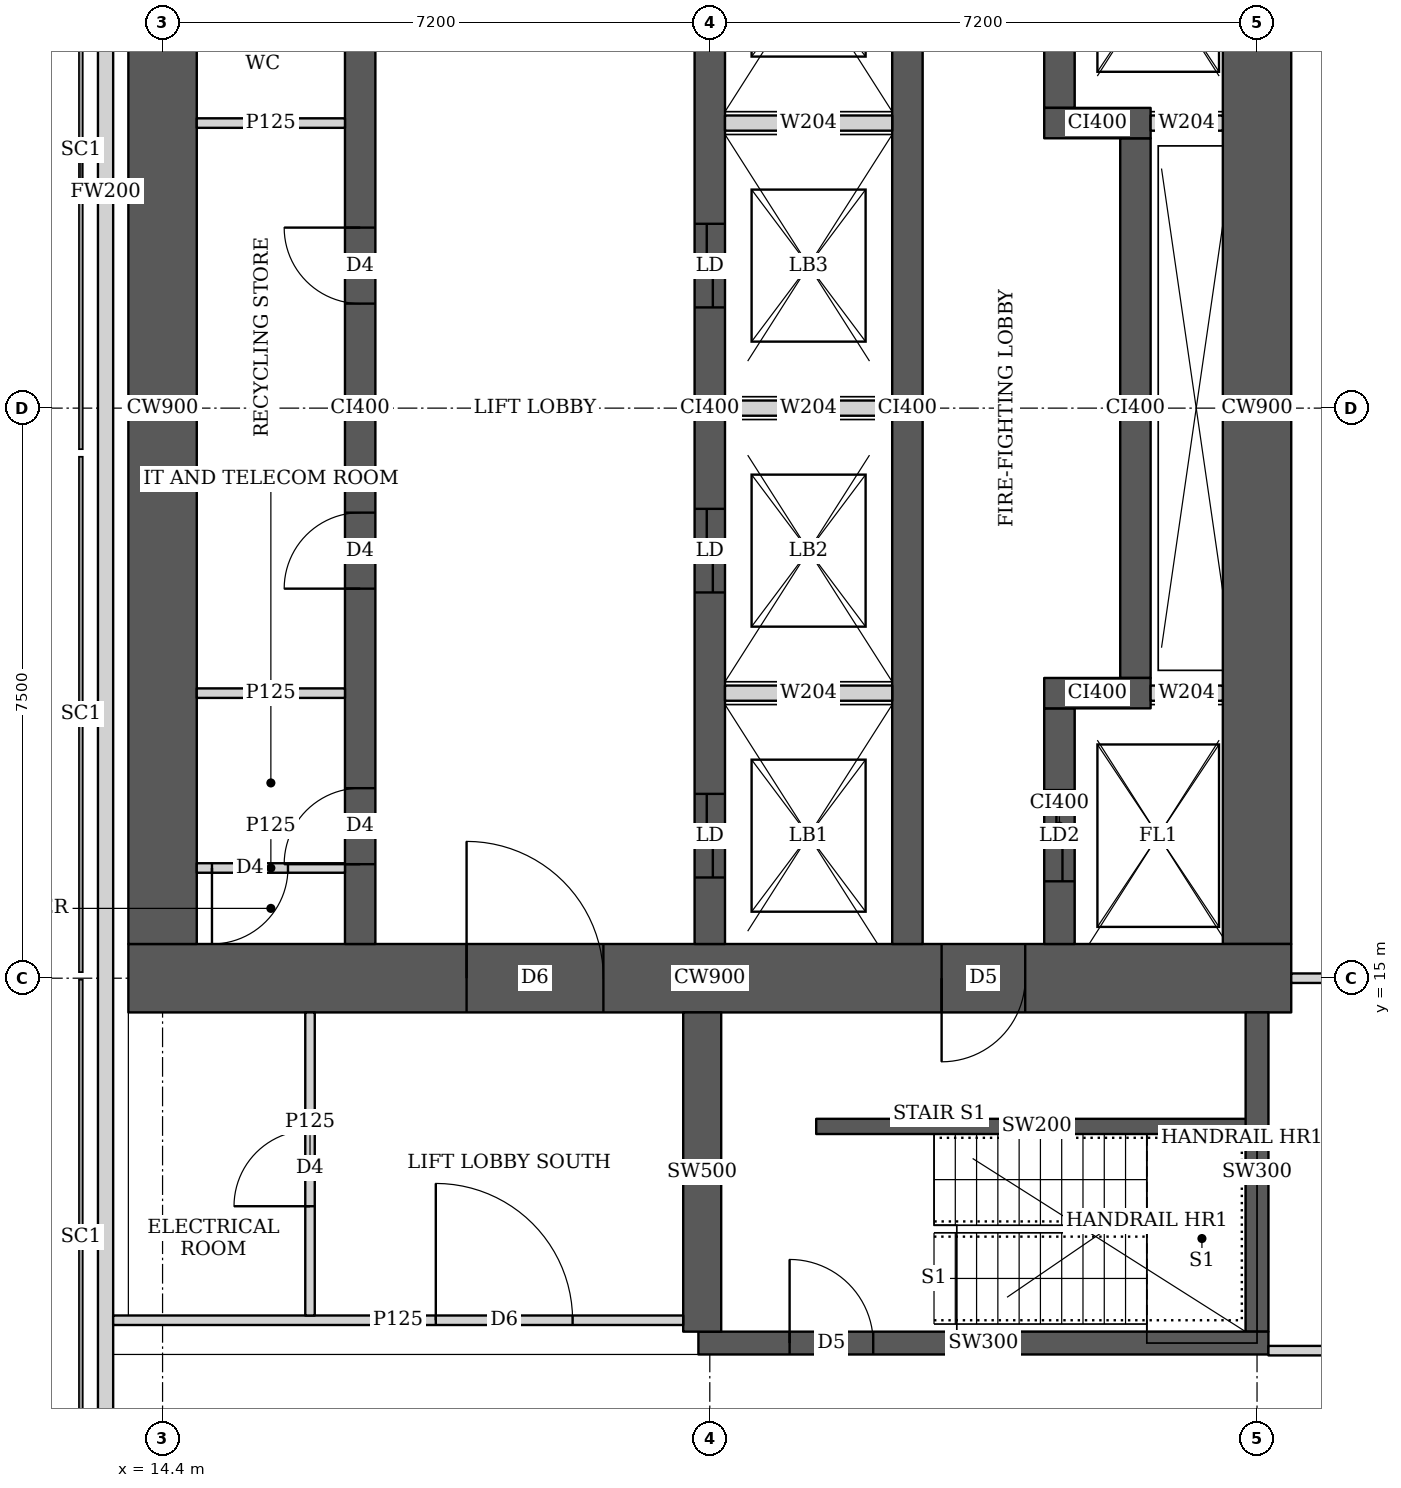
"""IFC4 building model, lengths in metres.
Left out: names, types, materials, properties, quantities, classifications, styles, units other than length and angle.
Written with IfcOpenShell. Run it as: python <this file> out.ifc"""

import sys

from ifc_helpers import new_model, si_unit, direction, frame, frame_2d, origin, place, context, subcontext, project, spatial, rectangle, extrude, element, fill, save


model = new_model("IFC4")
c1 = context("Model", 3, precision=1e-05, world=origin(), true_north=direction((0.0, 1.0)))
c2 = subcontext(c1, "Body", "Model", "MODEL_VIEW")
j1 = project(units=[si_unit("LENGTHUNIT", "METRE"), si_unit("PLANEANGLEUNIT", "RADIAN")], contexts=[c1])
p1 = place(None, origin())
s1 = spatial("IfcSite", under=j1, at=p1, CompositionType="ELEMENT")
p2 = place(p1, origin())
s2 = spatial("IfcBuilding", under=s1, at=p2, CompositionType="ELEMENT")
p3 = place(p2, frame((0.0, 0.0, 289.1)))
s3 = spatial("IfcBuildingStorey", under=s2, at=p3, CompositionType="ELEMENT", Elevation=289.1)
p4 = place(p3, frame((13.95, 15.0, 0.0), z_axis=(0.0, 0.0, 1.0), x_axis=(1.0, 0.0, 0.0)))
e1 = element("IfcWall", 1, at=p4, inside=s3, PredefinedType="SHEAR", context=c2, shape_type="SweptSolid", body=[
    extrude(rectangle(XDim=15.3, YDim=0.9, at=frame_2d((7.65, 0.0))), origin(), (0.0, 0.0, 1.0), 3.75),
])
p5 = place(p4, frame((4.45, 0.0, 0.0)))
e2 = element("IfcOpeningElement", 2, at=p5, cuts=e1, PredefinedType="OPENING", context=c2, shape_type="SweptSolid", body=[
    extrude(rectangle(XDim=1.8, YDim=2.1, at=frame_2d((0.9, 1.05))), frame((0.0, 0.46, 0.0), z_axis=(0.0, -1.0, 0.0), x_axis=(1.0, 0.0, 0.0)), (0.0, 0.0, 1.0), 0.92),
])
p6 = place(p4, frame((10.7, 0.0, 0.0)))
e3 = element("IfcOpeningElement", 3, at=p6, cuts=e1, PredefinedType="OPENING", context=c2, shape_type="SweptSolid", body=[
    extrude(rectangle(XDim=1.1, YDim=2.1, at=frame_2d((0.55, 1.05))), frame((0.0, 0.46, 0.0), z_axis=(0.0, -1.0, 0.0), x_axis=(1.0, 0.0, 0.0)), (0.0, 0.0, 1.0), 0.92),
])
for number, where, z_axis, x_axis in (
    (4, (14.4, 15.45, 0.0), (0.0, 0.0, 1.0), (0.0, 1.0, 0.0)),
    (5, (28.8, 15.45, 0.0), (0.0, 0.0, 1.0), (0.0, 1.0, 0.0)),
):
    element("IfcWall", number, at=place(p3, frame(where, z_axis=z_axis, x_axis=x_axis)), inside=s3, PredefinedType="SHEAR", context=c2, shape_type="SweptSolid", body=[
        extrude(rectangle(XDim=14.1, YDim=0.9, at=frame_2d((7.05, 0.0))), origin(), (0.0, 0.0, 1.0), 3.75),
    ])
p7 = place(p3, frame((17.0, 15.45, 0.0), z_axis=(0.0, 0.0, 1.0), x_axis=(0.0, 1.0, 0.0)))
e6 = element("IfcWall", 6, at=p7, inside=s3, PredefinedType="SHEAR", context=c2, shape_type="SweptSolid", body=[
    extrude(rectangle(XDim=14.1, YDim=0.4, at=frame_2d((7.05, 0.0))), origin(), (0.0, 0.0, 1.0), 3.75),
])
p8 = place(p7, frame((1.05, 0.0, 0.0)))
e7 = element("IfcOpeningElement", 7, at=p8, cuts=e6, PredefinedType="OPENING", context=c2, shape_type="SweptSolid", body=[
    extrude(rectangle(XDim=1.0, YDim=2.1, at=frame_2d((0.5, 1.05))), frame((0.0, 0.21, 0.0), z_axis=(0.0, -1.0, 0.0), x_axis=(1.0, 0.0, 0.0)), (0.0, 0.0, 1.0), 0.42),
])
p9 = place(p7, frame((4.675, 0.0, 0.0)))
e8 = element("IfcOpeningElement", 8, at=p9, cuts=e6, PredefinedType="OPENING", context=c2, shape_type="SweptSolid", body=[
    extrude(rectangle(XDim=1.0, YDim=2.1, at=frame_2d((0.5, 1.05))), frame((0.0, 0.21, 0.0), z_axis=(0.0, -1.0, 0.0), x_axis=(1.0, 0.0, 0.0)), (0.0, 0.0, 1.0), 0.42),
])
p10 = place(p7, frame((8.425, 0.0, 0.0)))
e9 = element("IfcOpeningElement", 9, at=p10, cuts=e6, PredefinedType="OPENING", context=c2, shape_type="SweptSolid", body=[
    extrude(rectangle(XDim=1.0, YDim=2.1, at=frame_2d((0.5, 1.05))), frame((0.0, 0.21, 0.0), z_axis=(0.0, -1.0, 0.0), x_axis=(1.0, 0.0, 0.0)), (0.0, 0.0, 1.0), 0.42),
])
p11 = place(p7, frame((12.175, 0.0, 0.0)))
e10 = element("IfcOpeningElement", 10, at=p11, cuts=e6, PredefinedType="OPENING", context=c2, shape_type="SweptSolid", body=[
    extrude(rectangle(XDim=1.0, YDim=2.1, at=frame_2d((0.5, 1.05))), frame((0.0, 0.21, 0.0), z_axis=(0.0, -1.0, 0.0), x_axis=(1.0, 0.0, 0.0)), (0.0, 0.0, 1.0), 0.42),
])
p12 = place(p3, frame((21.6, 15.45, 0.0), z_axis=(0.0, 0.0, 1.0), x_axis=(0.0, 1.0, 0.0)))
e11 = element("IfcWall", 11, at=p12, inside=s3, PredefinedType="SHEAR", context=c2, shape_type="SweptSolid", body=[
    extrude(rectangle(XDim=14.1, YDim=0.4, at=frame_2d((7.05, 0.0))), origin(), (0.0, 0.0, 1.0), 3.75),
])
p13 = place(p12, frame((0.875, 0.0, 0.0)))
e12 = element("IfcOpeningElement", 12, at=p13, cuts=e11, PredefinedType="OPENING", context=c2, shape_type="SweptSolid", body=[
    extrude(rectangle(XDim=1.1, YDim=2.1, at=frame_2d((0.55, 1.05))), frame((0.0, 0.21, 0.0), z_axis=(0.0, -1.0, 0.0), x_axis=(1.0, 0.0, 0.0)), (0.0, 0.0, 1.0), 0.42),
])
p14 = place(p12, frame((4.625, 0.0, 0.0)))
e13 = element("IfcOpeningElement", 13, at=p14, cuts=e11, PredefinedType="OPENING", context=c2, shape_type="SweptSolid", body=[
    extrude(rectangle(XDim=1.1, YDim=2.1, at=frame_2d((0.55, 1.05))), frame((0.0, 0.21, 0.0), z_axis=(0.0, -1.0, 0.0), x_axis=(1.0, 0.0, 0.0)), (0.0, 0.0, 1.0), 0.42),
])
p15 = place(p12, frame((8.375, 0.0, 0.0)))
e14 = element("IfcOpeningElement", 14, at=p15, cuts=e11, PredefinedType="OPENING", context=c2, shape_type="SweptSolid", body=[
    extrude(rectangle(XDim=1.1, YDim=2.1, at=frame_2d((0.55, 1.05))), frame((0.0, 0.21, 0.0), z_axis=(0.0, -1.0, 0.0), x_axis=(1.0, 0.0, 0.0)), (0.0, 0.0, 1.0), 0.42),
])
p16 = place(p12, frame((12.125, 0.0, 0.0)))
e15 = element("IfcOpeningElement", 15, at=p16, cuts=e11, PredefinedType="OPENING", context=c2, shape_type="SweptSolid", body=[
    extrude(rectangle(XDim=1.1, YDim=2.1, at=frame_2d((0.55, 1.05))), frame((0.0, 0.21, 0.0), z_axis=(0.0, -1.0, 0.0), x_axis=(1.0, 0.0, 0.0)), (0.0, 0.0, 1.0), 0.42),
])
p17 = place(p3, frame((24.2, 15.45, 0.0), z_axis=(0.0, 0.0, 1.0), x_axis=(0.0, 1.0, 0.0)))
e16 = element("IfcWall", 16, at=p17, inside=s3, PredefinedType="SHEAR", context=c2, shape_type="SweptSolid", body=[
    extrude(rectangle(XDim=14.1, YDim=0.4, at=frame_2d((7.05, 0.0))), origin(), (0.0, 0.0, 1.0), 3.75),
])
p18 = place(p3, frame((26.2, 15.45, 0.0), z_axis=(0.0, 0.0, 1.0), x_axis=(0.0, 1.0, 0.0)))
e17 = element("IfcWall", 17, at=p18, inside=s3, PredefinedType="SHEAR", context=c2, shape_type="SweptSolid", body=[
    extrude(rectangle(XDim=3.1, YDim=0.4, at=frame_2d((1.55, 0.0))), origin(), (0.0, 0.0, 1.0), 3.75),
])
p19 = place(p18, frame((0.825, 0.0, 0.0)))
e18 = element("IfcOpeningElement", 18, at=p19, cuts=e17, PredefinedType="OPENING", context=c2, shape_type="SweptSolid", body=[
    extrude(rectangle(XDim=1.2, YDim=2.1, at=frame_2d((0.6, 1.05))), frame((0.0, 0.21, 0.0), z_axis=(0.0, -1.0, 0.0), x_axis=(1.0, 0.0, 0.0)), (0.0, 0.0, 1.0), 0.42),
])
p20 = place(p3, frame((26.0, 18.75, 0.0), z_axis=(0.0, 0.0, 1.0), x_axis=(1.0, 0.0, 0.0)))
e19 = element("IfcWall", 19, at=p20, inside=s3, PredefinedType="SHEAR", context=c2, shape_type="SweptSolid", body=[
    extrude(rectangle(XDim=1.4, YDim=0.4, at=frame_2d((0.7, 0.0))), origin(), (0.0, 0.0, 1.0), 3.75),
])
p21 = place(p3, frame((27.2, 18.95, 0.0), z_axis=(0.0, 0.0, 1.0), x_axis=(0.0, 1.0, 0.0)))
e20 = element("IfcWall", 20, at=p21, inside=s3, PredefinedType="SHEAR", context=c2, shape_type="SweptSolid", body=[
    extrude(rectangle(XDim=7.1, YDim=0.4, at=frame_2d((3.55, 0.0))), origin(), (0.0, 0.0, 1.0), 3.75),
])
p22 = place(p3, frame((26.0, 26.25, 0.0), z_axis=(0.0, 0.0, 1.0), x_axis=(1.0, 0.0, 0.0)))
e21 = element("IfcWall", 21, at=p22, inside=s3, PredefinedType="SHEAR", context=c2, shape_type="SweptSolid", body=[
    extrude(rectangle(XDim=1.4, YDim=0.4, at=frame_2d((0.7, 0.0))), origin(), (0.0, 0.0, 1.0), 3.75),
])
p23 = place(p3, frame((26.2, 26.45, 0.0), z_axis=(0.0, 0.0, 1.0), x_axis=(0.0, 1.0, 0.0)))
e22 = element("IfcWall", 22, at=p23, inside=s3, PredefinedType="SHEAR", context=c2, shape_type="SweptSolid", body=[
    extrude(rectangle(XDim=3.1, YDim=0.4, at=frame_2d((1.55, 0.0))), origin(), (0.0, 0.0, 1.0), 3.75),
])
p24 = place(p23, frame((1.075, 0.0, 0.0)))
e23 = element("IfcOpeningElement", 23, at=p24, cuts=e22, PredefinedType="OPENING", context=c2, shape_type="SweptSolid", body=[
    extrude(rectangle(XDim=1.2, YDim=2.1, at=frame_2d((0.6, 1.05))), frame((0.0, 0.21, 0.0), z_axis=(0.0, -1.0, 0.0), x_axis=(1.0, 0.0, 0.0)), (0.0, 0.0, 1.0), 0.42),
])
p25 = place(p3, frame((21.45, 10.2, 0.0), z_axis=(0.0, 0.0, 1.0), x_axis=(1.0, 0.0, 0.0)))
e24 = element("IfcWall", 24, at=p25, inside=s3, PredefinedType="SHEAR", context=c2, shape_type="SweptSolid", body=[
    extrude(rectangle(XDim=7.5, YDim=0.3, at=frame_2d((3.75, 0.0))), origin(), (0.0, 0.0, 1.0), 3.75),
])
p26 = place(p25, frame((1.2, 0.0, 0.0)))
e25 = element("IfcOpeningElement", 25, at=p26, cuts=e24, PredefinedType="OPENING", context=c2, shape_type="SweptSolid", body=[
    extrude(rectangle(XDim=1.1, YDim=2.1, at=frame_2d((0.55, 1.05))), frame((0.0, 0.16, 0.0), z_axis=(0.0, -1.0, 0.0), x_axis=(1.0, 0.0, 0.0)), (0.0, 0.0, 1.0), 0.32),
])
p27 = place(p3, frame((21.5, 10.35, 0.0), z_axis=(0.0, 0.0, 1.0), x_axis=(0.0, 1.0, 0.0)))
e26 = element("IfcWall", 26, at=p27, inside=s3, PredefinedType="SHEAR", context=c2, shape_type="SweptSolid", body=[
    extrude(rectangle(XDim=4.2, YDim=0.5, at=frame_2d((2.1, 0.0))), origin(), (0.0, 0.0, 1.0), 3.75),
])
p28 = place(p3, frame((28.8, 10.35, 0.0), z_axis=(0.0, 0.0, 1.0), x_axis=(0.0, 1.0, 0.0)))
e27 = element("IfcWall", 27, at=p28, inside=s3, PredefinedType="SHEAR", context=c2, shape_type="SweptSolid", body=[
    extrude(rectangle(XDim=4.2, YDim=0.3, at=frame_2d((2.1, 0.0))), origin(), (0.0, 0.0, 1.0), 3.75),
])
p29 = place(p3, frame((13.65, 43.037, 0.0), z_axis=(0.0, 0.0, 1.0), x_axis=(0.0, -1.0, 0.0)))
e28 = element("IfcWall", 28, at=p29, inside=s3, PredefinedType="SOLIDWALL", context=c2, shape_type="SweptSolid", body=[
    extrude(rectangle(XDim=35.374, YDim=0.2, at=frame_2d((17.687, 0.0))), origin(), (0.0, 0.0, 1.0), 3.5),
])
p30 = place(p3, frame((13.75, 10.5, 0.0), z_axis=(0.0, 0.0, 1.0), x_axis=(1.0, 0.0, 0.0)))
e29 = element("IfcWall", 29, at=p30, inside=s3, PredefinedType="PARTITIONING", context=c2, shape_type="SweptSolid", body=[
    extrude(rectangle(XDim=7.5, YDim=0.125, at=frame_2d((3.75, 0.0))), origin(), (0.0, 0.0, 1.0), 3.5),
])
p31 = place(p30, frame((4.245, 0.0, 0.0)))
e30 = element("IfcOpeningElement", 30, at=p31, cuts=e29, PredefinedType="OPENING", context=c2, shape_type="SweptSolid", body=[
    extrude(rectangle(XDim=1.8, YDim=2.1, at=frame_2d((0.9, 1.05))), frame((0.0, 0.073, 0.0), z_axis=(0.0, -1.0, 0.0), x_axis=(1.0, 0.0, 0.0)), (0.0, 0.0, 1.0), 0.145),
])
p32 = place(p3, frame((16.34, 10.562, 0.0), z_axis=(0.0, 0.0, 1.0), x_axis=(0.0, 1.0, 0.0)))
e31 = element("IfcWall", 31, at=p32, inside=s3, PredefinedType="PARTITIONING", context=c2, shape_type="SweptSolid", body=[
    extrude(rectangle(XDim=3.988, YDim=0.125, at=frame_2d((1.994, 0.0))), origin(), (0.0, 0.0, 1.0), 3.5),
])
p33 = place(p32, frame((1.438, 0.0, 0.0)))
e32 = element("IfcOpeningElement", 32, at=p33, cuts=e31, PredefinedType="OPENING", context=c2, shape_type="SweptSolid", body=[
    extrude(rectangle(XDim=1.0, YDim=2.1, at=frame_2d((0.5, 1.05))), frame((0.0, 0.073, 0.0), z_axis=(0.0, -1.0, 0.0), x_axis=(1.0, 0.0, 0.0)), (0.0, 0.0, 1.0), 0.145),
])
p34 = place(p3, frame((28.95, 10.1, 0.0), z_axis=(0.0, 0.0, 1.0), x_axis=(1.0, 0.0, 0.0)))
e33 = element("IfcWall", 33, at=p34, inside=s3, PredefinedType="PARTITIONING", context=c2, shape_type="SweptSolid", body=[
    extrude(rectangle(XDim=9.188, YDim=0.125, at=frame_2d((4.594, 0.0))), origin(), (0.0, 0.0, 1.0), 3.5),
])
p35 = place(p3, frame((29.25, 15.0, 0.0), z_axis=(0.0, 0.0, 1.0), x_axis=(1.0, 0.0, 0.0)))
e34 = element("IfcWall", 34, at=p35, inside=s3, PredefinedType="PARTITIONING", context=c2, shape_type="SweptSolid", body=[
    extrude(rectangle(XDim=6.049, YDim=0.125, at=frame_2d((3.024, 0.0))), origin(), (0.0, 0.0, 1.0), 3.5),
])
p36 = place(p3, frame((14.85, 16.45, 0.0), z_axis=(0.0, 0.0, 1.0), x_axis=(1.0, 0.0, 0.0)))
e35 = element("IfcWall", 35, at=p36, inside=s3, PredefinedType="PARTITIONING", context=c2, shape_type="SweptSolid", body=[
    extrude(rectangle(XDim=1.95, YDim=0.125, at=frame_2d((0.975, 0.0))), origin(), (0.0, 0.0, 1.0), 3.5),
])
p37 = place(p36, frame((0.2, 0.0, 0.0)))
e36 = element("IfcOpeningElement", 36, at=p37, cuts=e35, PredefinedType="OPENING", context=c2, shape_type="SweptSolid", body=[
    extrude(rectangle(XDim=1.0, YDim=2.1, at=frame_2d((0.5, 1.05))), frame((0.0, 0.073, 0.0), z_axis=(0.0, -1.0, 0.0), x_axis=(1.0, 0.0, 0.0)), (0.0, 0.0, 1.0), 0.145),
])
for number, where, z_axis, x_axis in (
    (37, (14.85, 18.75, 0.0), (0.0, 0.0, 1.0), (1.0, 0.0, 0.0)),
    (38, (14.85, 26.25, 0.0), (0.0, 0.0, 1.0), (1.0, 0.0, 0.0)),
):
    element("IfcWall", number, at=place(p3, frame(where, z_axis=z_axis, x_axis=x_axis)), inside=s3, PredefinedType="PARTITIONING", context=c2, shape_type="SweptSolid", body=[
        extrude(rectangle(XDim=1.95, YDim=0.125, at=frame_2d((0.975, 0.0))), origin(), (0.0, 0.0, 1.0), 3.5),
    ])
p38 = place(p3, frame((23.0, 13.05, 0.0), z_axis=(0.0, 0.0, 1.0), x_axis=(1.0, 0.0, 0.0)))
e39 = element("IfcWall", 39, at=p38, inside=s3, PredefinedType="SHEAR", context=c2, shape_type="SweptSolid", body=[
    extrude(rectangle(XDim=5.8, YDim=0.2, at=frame_2d((2.9, 0.0))), origin(), (0.0, 0.0, 1.0), 3.75),
])
for number, where, z_axis, x_axis in (
    (40, (21.8, 18.75, 0.0), (0.0, 0.0, 1.0), (1.0, 0.0, 0.0)),
    (41, (21.8, 22.5, 0.0), (0.0, 0.0, 1.0), (1.0, 0.0, 0.0)),
    (42, (21.8, 26.25, 0.0), (0.0, 0.0, 1.0), (1.0, 0.0, 0.0)),
):
    element("IfcWall", number, at=place(p3, frame(where, z_axis=z_axis, x_axis=x_axis)), inside=s3, PredefinedType="SOLIDWALL", context=c2, shape_type="SweptSolid", body=[
        extrude(rectangle(XDim=2.2, YDim=0.2, at=frame_2d((1.1, 0.0))), origin(), (0.0, 0.0, 1.0), 3.5),
    ])
for number, where, z_axis, x_axis in (
    (43, (27.4, 18.75, 0.0), (0.0, 0.0, 1.0), (1.0, 0.0, 0.0)),
    (44, (27.4, 26.25, 0.0), (0.0, 0.0, 1.0), (1.0, 0.0, 0.0)),
):
    element("IfcWall", number, at=place(p3, frame(where, z_axis=z_axis, x_axis=x_axis)), inside=s3, PredefinedType="SOLIDWALL", context=c2, shape_type="SweptSolid", body=[
        extrude(rectangle(XDim=0.95, YDim=0.2, at=frame_2d((0.475, 0.0))), origin(), (0.0, 0.0, 1.0), 3.5),
    ])
p39 = place(p33, origin())
e45 = element("IfcDoor", 45, at=p39, inside=s3, OperationType="SINGLE_SWING_LEFT", PredefinedType="DOOR", context=c2, shape_type="SweptSolid", body=[
    extrude(rectangle(XDim=1.0, YDim=2.1, at=frame_2d((0.5, 1.05))), frame((0.0, 0.025, 0.0), z_axis=(0.0, -1.0, 0.0), x_axis=(1.0, 0.0, 0.0)), (0.0, 0.0, 1.0), 0.05),
])
fill(e32, e45)
p40 = place(p31, origin())
e46 = element("IfcDoor", 46, at=p40, inside=s3, OperationType="DOUBLE_DOOR_SINGLE_SWING", PredefinedType="DOOR", context=c2, shape_type="SweptSolid", body=[
    extrude(rectangle(XDim=1.8, YDim=2.1, at=frame_2d((0.9, 1.05))), frame((0.0, 0.025, 0.0), z_axis=(0.0, -1.0, 0.0), x_axis=(1.0, 0.0, 0.0)), (0.0, 0.0, 1.0), 0.05),
])
fill(e30, e46)
p41 = place(p37, origin())
e47 = element("IfcDoor", 47, at=p41, inside=s3, OperationType="SINGLE_SWING_RIGHT", PredefinedType="DOOR", context=c2, shape_type="SweptSolid", body=[
    extrude(rectangle(XDim=1.0, YDim=2.1, at=frame_2d((0.5, 1.05))), frame((0.0, 0.025, 0.0), z_axis=(0.0, -1.0, 0.0), x_axis=(1.0, 0.0, 0.0)), (0.0, 0.0, 1.0), 0.05),
])
fill(e36, e47)
p42 = place(p8, origin())
e48 = element("IfcDoor", 48, at=p42, inside=s3, OperationType="SINGLE_SWING_LEFT", PredefinedType="DOOR", context=c2, shape_type="SweptSolid", body=[
    extrude(rectangle(XDim=1.0, YDim=2.1, at=frame_2d((0.5, 1.05))), frame((0.0, 0.025, 0.0), z_axis=(0.0, -1.0, 0.0), x_axis=(1.0, 0.0, 0.0)), (0.0, 0.0, 1.0), 0.05),
])
fill(e7, e48)
p43 = place(p9, origin())
e49 = element("IfcDoor", 49, at=p43, inside=s3, OperationType="SINGLE_SWING_LEFT", PredefinedType="DOOR", context=c2, shape_type="SweptSolid", body=[
    extrude(rectangle(XDim=1.0, YDim=2.1, at=frame_2d((0.5, 1.05))), frame((0.0, 0.025, 0.0), z_axis=(0.0, -1.0, 0.0), x_axis=(1.0, 0.0, 0.0)), (0.0, 0.0, 1.0), 0.05),
])
fill(e8, e49)
p44 = place(p10, origin())
e50 = element("IfcDoor", 50, at=p44, inside=s3, OperationType="SINGLE_SWING_RIGHT", PredefinedType="DOOR", context=c2, shape_type="SweptSolid", body=[
    extrude(rectangle(XDim=1.0, YDim=2.1, at=frame_2d((0.5, 1.05))), frame((0.0, 0.025, 0.0), z_axis=(0.0, -1.0, 0.0), x_axis=(1.0, 0.0, 0.0)), (0.0, 0.0, 1.0), 0.05),
])
fill(e9, e50)
p45 = place(p5, origin())
e51 = element("IfcDoor", 51, at=p45, inside=s3, OperationType="DOUBLE_DOOR_SINGLE_SWING", PredefinedType="DOOR", context=c2, shape_type="SweptSolid", body=[
    extrude(rectangle(XDim=1.8, YDim=2.1, at=frame_2d((0.9, 1.05))), frame((0.0, 0.025, 0.0), z_axis=(0.0, -1.0, 0.0), x_axis=(1.0, 0.0, 0.0)), (0.0, 0.0, 1.0), 0.05),
])
fill(e2, e51)
p46 = place(p6, origin())
e52 = element("IfcDoor", 52, at=p46, inside=s3, OperationType="SINGLE_SWING_RIGHT", PredefinedType="DOOR", context=c2, shape_type="SweptSolid", body=[
    extrude(rectangle(XDim=1.1, YDim=2.1, at=frame_2d((0.55, 1.05))), frame((0.0, 0.025, 0.0), z_axis=(0.0, -1.0, 0.0), x_axis=(1.0, 0.0, 0.0)), (0.0, 0.0, 1.0), 0.05),
])
fill(e3, e52)
p47 = place(p19, origin())
e53 = element("IfcDoor", 53, at=p47, inside=s3, OperationType="DOUBLE_DOOR_SLIDING", PredefinedType="DOOR", context=c2, shape_type="SweptSolid", body=[
    extrude(rectangle(XDim=1.2, YDim=2.1, at=frame_2d((0.6, 1.05))), frame((0.0, 0.025, 0.0), z_axis=(0.0, -1.0, 0.0), x_axis=(1.0, 0.0, 0.0)), (0.0, 0.0, 1.0), 0.05),
])
fill(e18, e53)
p48 = place(p13, origin())
e54 = element("IfcDoor", 54, at=p48, inside=s3, OperationType="DOUBLE_DOOR_SLIDING", PredefinedType="DOOR", context=c2, shape_type="SweptSolid", body=[
    extrude(rectangle(XDim=1.1, YDim=2.1, at=frame_2d((0.55, 1.05))), frame((0.0, 0.025, 0.0), z_axis=(0.0, -1.0, 0.0), x_axis=(1.0, 0.0, 0.0)), (0.0, 0.0, 1.0), 0.05),
])
fill(e12, e54)
p49 = place(p14, origin())
e55 = element("IfcDoor", 55, at=p49, inside=s3, OperationType="DOUBLE_DOOR_SLIDING", PredefinedType="DOOR", context=c2, shape_type="SweptSolid", body=[
    extrude(rectangle(XDim=1.1, YDim=2.1, at=frame_2d((0.55, 1.05))), frame((0.0, 0.025, 0.0), z_axis=(0.0, -1.0, 0.0), x_axis=(1.0, 0.0, 0.0)), (0.0, 0.0, 1.0), 0.05),
])
fill(e13, e55)
p50 = place(p15, origin())
e56 = element("IfcDoor", 56, at=p50, inside=s3, OperationType="DOUBLE_DOOR_SLIDING", PredefinedType="DOOR", context=c2, shape_type="SweptSolid", body=[
    extrude(rectangle(XDim=1.1, YDim=2.1, at=frame_2d((0.55, 1.05))), frame((0.0, 0.025, 0.0), z_axis=(0.0, -1.0, 0.0), x_axis=(1.0, 0.0, 0.0)), (0.0, 0.0, 1.0), 0.05),
])
fill(e14, e56)
p51 = place(p26, origin())
e57 = element("IfcDoor", 57, at=p51, inside=s3, OperationType="SINGLE_SWING_LEFT", PredefinedType="DOOR", context=c2, shape_type="SweptSolid", body=[
    extrude(rectangle(XDim=1.1, YDim=2.1, at=frame_2d((0.55, 1.05))), frame((0.0, 0.025, 0.0), z_axis=(0.0, -1.0, 0.0), x_axis=(1.0, 0.0, 0.0)), (0.0, 0.0, 1.0), 0.05),
])
fill(e25, e57)
save(model, sys.argv[1])
